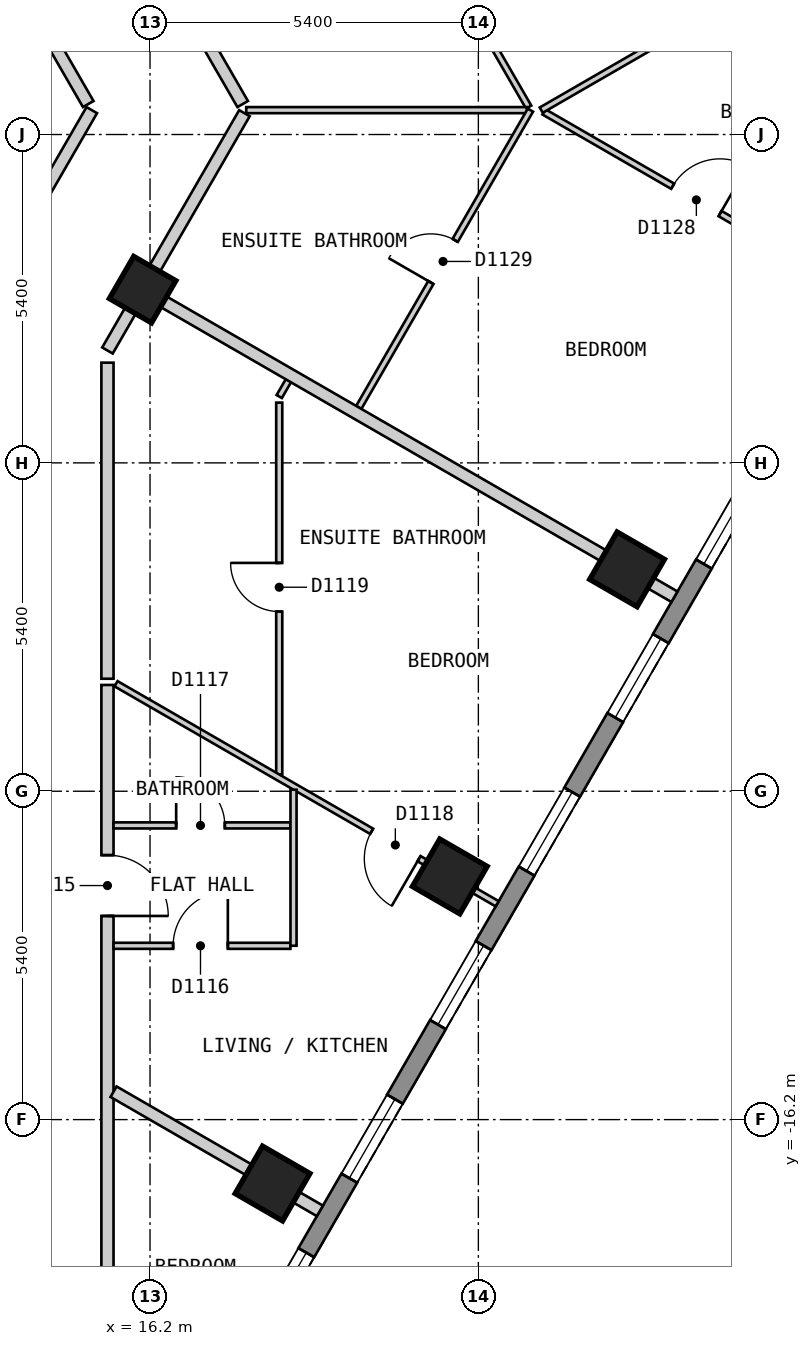
"""IFC4 building model, lengths in metres.
Left out: names, types, materials, properties, quantities, classifications, styles, units other than length and angle.
Written with IfcOpenShell. Run it as: python <this file> out.ifc"""

import sys

from ifc_helpers import new_model, si_unit, direction, frame, frame_2d, origin, origin_2d, place, context, subcontext, project, spatial, polyline, rectangle, outline, extrude, element, fill, save


model = new_model("IFC4")
c1 = context("Model", 3, precision=1e-05, world=origin(), true_north=direction((0.0, 1.0)))
c2 = subcontext(c1, "Body", "Model", "MODEL_VIEW")
j1 = project(units=[si_unit("LENGTHUNIT", "METRE"), si_unit("PLANEANGLEUNIT", "RADIAN")], contexts=[c1])
p1 = place(None, origin())
s1 = spatial("IfcSite", under=j1, at=p1, CompositionType="ELEMENT")
p2 = place(p1, origin())
s2 = spatial("IfcBuilding", under=s1, at=p2, CompositionType="ELEMENT")
p3 = place(p2, frame((0.0, 0.0, 144.6)))
s3 = spatial("IfcBuildingStorey", under=s2, at=p3, CompositionType="ELEMENT", Elevation=144.6)
for number, where, z_axis, x_axis in (
    (1, (18.215, -17.251, 0.0), (0.0, 0.0, 1.0), (0.5, 0.866, 0.0)),
    (2, (21.13, -12.201, 0.0), (0.0, 0.0, 1.0), (0.5, 0.866, 0.0)),
    (3, (24.046, -7.151, 0.0), (0.0, 0.0, 1.0), (0.5, 0.866, 0.0)),
):
    element("IfcColumn", number, at=place(p3, frame(where, z_axis=z_axis, x_axis=x_axis)), inside=s3, PredefinedType="COLUMN", context=c2, shape_type="SweptSolid", body=[
        extrude(rectangle(XDim=0.9, YDim=0.9, at=origin_2d()), origin(), (0.0, 0.0, 1.0), 3.0),
    ])
p4 = place(p3, frame((16.078, -2.551, 0.0), z_axis=(0.0, 0.0, 1.0), x_axis=(0.5, 0.866025403784, 0.0)))
e4 = element("IfcColumn", 4, at=p4, inside=s3, PredefinedType="COLUMN", context=c2, shape_type="SweptSolid", body=[
    extrude(rectangle(XDim=0.8, YDim=0.8, at=origin_2d()), origin(), (0.0, 0.0, 1.0), 3.0),
])
p5 = place(p3, frame((15.862, -23.425, 0.0), z_axis=(0.0, 0.0, 1.0), x_axis=(0.500017503135, 0.866015298109, 0.0)))
e5 = element("IfcWall", 5, at=p5, inside=s3, PredefinedType="SOLIDWALL", context=c2, shape_type="SweptSolid", body=[
    extrude(outline(polyline([(0.0, -0.15), (24.711, -0.15), (24.631, 0.15), (0.08, 0.15), (0.0, -0.15)])), origin(), (0.0, 0.0, 1.0), 2.7),
])
p6 = place(p5, frame((1.4, 0.0, 0.15)))
e6 = element("IfcOpeningElement", 6, at=p6, cuts=e5, PredefinedType="OPENING", context=c2, shape_type="SweptSolid", body=[
    extrude(rectangle(XDim=1.5, YDim=2.1, at=frame_2d((0.75, 1.05))), frame((0.0, 0.16, 0.0), z_axis=(0.0, -1.0, 0.0), x_axis=(1.0, 0.0, 0.0)), (0.0, 0.0, 1.0), 0.32),
])
p7 = place(p5, frame((4.316, 0.0, 0.15)))
e7 = element("IfcOpeningElement", 7, at=p7, cuts=e5, PredefinedType="OPENING", context=c2, shape_type="SweptSolid", body=[
    extrude(rectangle(XDim=1.5, YDim=2.1, at=frame_2d((0.75, 1.05))), frame((0.0, 0.16, 0.0), z_axis=(0.0, -1.0, 0.0), x_axis=(1.0, 0.0, 0.0)), (0.0, 0.0, 1.0), 0.32),
])
p8 = place(p5, frame((7.231, 0.0, 0.15)))
e8 = element("IfcOpeningElement", 8, at=p8, cuts=e5, PredefinedType="OPENING", context=c2, shape_type="SweptSolid", body=[
    extrude(rectangle(XDim=1.5, YDim=2.1, at=frame_2d((0.75, 1.05))), frame((0.0, 0.16, 0.0), z_axis=(0.0, -1.0, 0.0), x_axis=(1.0, 0.0, 0.0)), (0.0, 0.0, 1.0), 0.32),
])
p9 = place(p5, frame((10.147, 0.0, 0.15)))
e9 = element("IfcOpeningElement", 9, at=p9, cuts=e5, PredefinedType="OPENING", context=c2, shape_type="SweptSolid", body=[
    extrude(rectangle(XDim=1.5, YDim=2.1, at=frame_2d((0.75, 1.05))), frame((0.0, 0.16, 0.0), z_axis=(0.0, -1.0, 0.0), x_axis=(1.0, 0.0, 0.0)), (0.0, 0.0, 1.0), 0.32),
])
p10 = place(p5, frame((13.062, 0.0, 0.15)))
e10 = element("IfcOpeningElement", 10, at=p10, cuts=e5, PredefinedType="OPENING", context=c2, shape_type="SweptSolid", body=[
    extrude(rectangle(XDim=1.5, YDim=2.1, at=frame_2d((0.75, 1.05))), frame((0.0, 0.16, 0.0), z_axis=(0.0, -1.0, 0.0), x_axis=(1.0, 0.0, 0.0)), (0.0, 0.0, 1.0), 0.32),
])
p11 = place(p5, frame((15.977, 0.0, 0.15)))
e11 = element("IfcOpeningElement", 11, at=p11, cuts=e5, PredefinedType="OPENING", context=c2, shape_type="SweptSolid", body=[
    extrude(rectangle(XDim=1.5, YDim=2.1, at=frame_2d((0.75, 1.05))), frame((0.0, 0.16, 0.0), z_axis=(0.0, -1.0, 0.0), x_axis=(1.0, 0.0, 0.0)), (0.0, 0.0, 1.0), 0.32),
])
p12 = place(p5, frame((18.893, 0.0, 0.15)))
e12 = element("IfcOpeningElement", 12, at=p12, cuts=e5, PredefinedType="OPENING", context=c2, shape_type="SweptSolid", body=[
    extrude(rectangle(XDim=1.5, YDim=2.1, at=frame_2d((0.75, 1.05))), frame((0.0, 0.16, 0.0), z_axis=(0.0, -1.0, 0.0), x_axis=(1.0, 0.0, 0.0)), (0.0, 0.0, 1.0), 0.32),
])
p13 = place(p5, frame((21.809, 0.0, 0.15)))
e13 = element("IfcOpeningElement", 13, at=p13, cuts=e5, PredefinedType="OPENING", context=c2, shape_type="SweptSolid", body=[
    extrude(rectangle(XDim=1.5, YDim=2.1, at=frame_2d((0.75, 1.05))), frame((0.0, 0.16, 0.0), z_axis=(0.0, -1.0, 0.0), x_axis=(1.0, 0.0, 0.0)), (0.0, 0.0, 1.0), 0.32),
])
p14 = place(p3, frame((7.967, 13.0, 0.0), z_axis=(0.0, 0.0, 1.0), x_axis=(0.50003774998, -0.866003607726, 0.0)))
e14 = element("IfcWall", 14, at=p14, inside=s3, PredefinedType="PARTITIONING", context=c2, shape_type="SweptSolid", body=[
    extrude(rectangle(XDim=14.433, YDim=0.2, at=frame_2d((7.217, 0.0))), origin(), (0.0, 0.0, 1.0), 2.7),
])
p15 = place(p14, frame((6.824, 0.0, 0.0)))
e15 = element("IfcOpeningElement", 15, at=p15, cuts=e14, PredefinedType="OPENING", context=c2, shape_type="SweptSolid", body=[
    extrude(rectangle(XDim=0.9, YDim=2.1, at=frame_2d((0.45, 1.05))), frame((0.0, 0.11, 0.0), z_axis=(0.0, -1.0, 0.0), x_axis=(1.0, 0.0, 0.0)), (0.0, 0.0, 1.0), 0.22),
])
p16 = place(p3, frame((9.296, 15.1, 0.0), z_axis=(0.0, 0.0, 1.0), x_axis=(0.499974024244, -0.866040400375, 0.0)))
e16 = element("IfcWall", 16, at=p16, inside=s3, PredefinedType="PARTITIONING", context=c2, shape_type="SweptSolid", body=[
    extrude(rectangle(XDim=16.857, YDim=0.2, at=frame_2d((8.429, 0.0))), origin(), (0.0, 0.0, 1.0), 2.7),
])
p17 = place(p16, frame((11.522, 0.0, 0.0)))
e17 = element("IfcOpeningElement", 17, at=p17, cuts=e16, PredefinedType="OPENING", context=c2, shape_type="SweptSolid", body=[
    extrude(rectangle(XDim=1.0, YDim=2.1, at=frame_2d((0.5, 1.05))), frame((0.0, 0.11, 0.0), z_axis=(0.0, -1.0, 0.0), x_axis=(1.0, 0.0, 0.0)), (0.0, 0.0, 1.0), 0.22),
])
p18 = place(p3, frame((15.5, -3.752, 0.0), z_axis=(0.0, 0.0, 1.0), x_axis=(0.0, -1.0, 0.0)))
e18 = element("IfcWall", 18, at=p18, inside=s3, PredefinedType="PARTITIONING", context=c2, shape_type="SweptSolid", body=[
    extrude(rectangle(XDim=5.198, YDim=0.2, at=frame_2d((2.599, 0.0))), origin(), (0.0, 0.0, 1.0), 2.7),
])
p19 = place(p3, frame((13.394, -2.8, 0.0), z_axis=(0.0, 0.0, 1.0), x_axis=(0.499968324138, 0.866043691079, 0.0)))
e19 = element("IfcWall", 19, at=p19, inside=s3, PredefinedType="PARTITIONING", context=c2, shape_type="SweptSolid", body=[
    extrude(rectangle(XDim=3.696, YDim=0.2, at=frame_2d((1.848, 0.0))), origin(), (0.0, 0.0, 1.0), 2.7),
])
p20 = place(p3, frame((15.5, -3.552, 0.0), z_axis=(0.0, 0.0, 1.0), x_axis=(0.499914724673, 0.86607463192, 0.0)))
e20 = element("IfcWall", 20, at=p20, inside=s3, PredefinedType="PARTITIONING", context=c2, shape_type="SweptSolid", body=[
    extrude(rectangle(XDim=4.507, YDim=0.2, at=frame_2d((2.253, 0.0))), origin(), (0.0, 0.0, 1.0), 2.7),
])
p21 = place(p3, frame((15.5, -21.199, 0.0), z_axis=(0.0, 0.0, 1.0), x_axis=(0.0, 1.0, 0.0)))
e21 = element("IfcWall", 21, at=p21, inside=s3, PredefinedType="PARTITIONING", context=c2, shape_type="SweptSolid", body=[
    extrude(rectangle(XDim=12.147, YDim=0.2, at=frame_2d((6.073, 0.0))), origin(), (0.0, 0.0, 1.0), 2.7),
])
p22 = place(p21, frame((8.348, 0.0, 0.0)))
e22 = element("IfcOpeningElement", 22, at=p22, cuts=e21, PredefinedType="OPENING", context=c2, shape_type="SweptSolid", body=[
    extrude(rectangle(XDim=1.0, YDim=2.1, at=frame_2d((0.5, 1.05))), frame((0.0, 0.11, 0.0), z_axis=(0.0, -1.0, 0.0), x_axis=(1.0, 0.0, 0.0)), (0.0, 0.0, 1.0), 0.22),
])
p23 = place(p3, frame((14.323, 14.487, 0.0), z_axis=(0.0, 0.0, 1.0), x_axis=(0.500011052545, -0.866019022501, 0.0)))
e23 = element("IfcWall", 23, at=p23, inside=s3, PredefinedType="PARTITIONING", context=c2, shape_type="SweptSolid", body=[
    extrude(rectangle(XDim=16.208, YDim=0.1, at=frame_2d((8.104, 0.0))), origin(), (0.0, 0.0, 1.0), 2.7),
])
p24 = place(p23, frame((8.484, 0.0, 0.0)))
e24 = element("IfcOpeningElement", 24, at=p24, cuts=e23, PredefinedType="OPENING", context=c2, shape_type="SweptSolid", body=[
    extrude(rectangle(XDim=0.9, YDim=2.1, at=frame_2d((0.45, 1.05))), frame((0.0, 0.06, 0.0), z_axis=(0.0, -1.0, 0.0), x_axis=(1.0, 0.0, 0.0)), (0.0, 0.0, 1.0), 0.12),
])
p25 = place(p23, frame((2.252, 0.0, 0.0)))
e25 = element("IfcOpeningElement", 25, at=p25, cuts=e23, PredefinedType="OPENING", context=c2, shape_type="SweptSolid", body=[
    extrude(rectangle(XDim=0.8, YDim=2.1, at=frame_2d((0.4, 1.05))), frame((0.0, 0.06, 0.0), z_axis=(0.0, -1.0, 0.0), x_axis=(1.0, 0.0, 0.0)), (0.0, 0.0, 1.0), 0.12),
])
p26 = place(p23, frame((13.167, 0.0, 0.0)))
e26 = element("IfcOpeningElement", 26, at=p26, cuts=e23, PredefinedType="OPENING", context=c2, shape_type="SweptSolid", body=[
    extrude(rectangle(XDim=0.8, YDim=2.1, at=frame_2d((0.4, 1.05))), frame((0.0, 0.06, 0.0), z_axis=(0.0, -1.0, 0.0), x_axis=(1.0, 0.0, 0.0)), (0.0, 0.0, 1.0), 0.12),
])
p27 = place(p3, frame((18.325, -4.409, 0.0), z_axis=(0.0, 0.0, 1.0), x_axis=(0.0, -1.0, 0.0)))
e27 = element("IfcWall", 27, at=p27, inside=s3, PredefinedType="PARTITIONING", context=c2, shape_type="SweptSolid", body=[
    extrude(rectangle(XDim=6.115, YDim=0.1, at=frame_2d((3.058, 0.0))), origin(), (0.0, 0.0, 1.0), 2.7),
])
p28 = place(p27, frame((2.636, 0.0, 0.0)))
e28 = element("IfcOpeningElement", 28, at=p28, cuts=e27, PredefinedType="OPENING", context=c2, shape_type="SweptSolid", body=[
    extrude(rectangle(XDim=0.8, YDim=2.1, at=frame_2d((0.4, 1.05))), frame((0.0, 0.06, 0.0), z_axis=(0.0, -1.0, 0.0), x_axis=(1.0, 0.0, 0.0)), (0.0, 0.0, 1.0), 0.12),
])
p29 = place(p3, frame((15.641, -9.032, 0.0), z_axis=(0.0, 0.0, 1.0), x_axis=(0.866049104564, -0.499958946799, 0.0)))
e29 = element("IfcWall", 29, at=p29, inside=s3, PredefinedType="PARTITIONING", context=c2, shape_type="SweptSolid", body=[
    extrude(rectangle(XDim=7.238, YDim=0.1, at=frame_2d((3.619, 0.0))), origin(), (0.0, 0.0, 1.0), 2.7),
])
p30 = place(p29, frame((4.854, 0.0, 0.0)))
e30 = element("IfcOpeningElement", 30, at=p30, cuts=e29, PredefinedType="OPENING", context=c2, shape_type="SweptSolid", body=[
    extrude(rectangle(XDim=0.9, YDim=2.1, at=frame_2d((0.45, 1.05))), frame((0.0, 0.06, 0.0), z_axis=(0.0, -1.0, 0.0), x_axis=(1.0, 0.0, 0.0)), (0.0, 0.0, 1.0), 0.12),
])
p31 = place(p3, frame((22.679, 0.372, 0.0), z_axis=(0.0, 0.0, 1.0), x_axis=(0.865985260119, -0.500069524424, 0.0)))
e31 = element("IfcWall", 31, at=p31, inside=s3, PredefinedType="PARTITIONING", context=c2, shape_type="SweptSolid", body=[
    extrude(rectangle(XDim=5.845, YDim=0.1, at=frame_2d((2.923, 0.0))), origin(), (0.0, 0.0, 1.0), 2.7),
])
p32 = place(p31, frame((2.444, 0.0, 0.0)))
e32 = element("IfcOpeningElement", 32, at=p32, cuts=e31, PredefinedType="OPENING", context=c2, shape_type="SweptSolid", body=[
    extrude(rectangle(XDim=0.9, YDim=2.1, at=frame_2d((0.45, 1.05))), frame((0.0, 0.06, 0.0), z_axis=(0.0, -1.0, 0.0), x_axis=(1.0, 0.0, 0.0)), (0.0, 0.0, 1.0), 0.12),
])
p33 = place(p3, frame((15.6, -11.362, 0.0), z_axis=(0.0, 0.0, 1.0), x_axis=(1.0, 0.0, 0.0)))
e33 = element("IfcWall", 33, at=p33, inside=s3, PredefinedType="PARTITIONING", context=c2, shape_type="SweptSolid", body=[
    extrude(rectangle(XDim=2.91, YDim=0.1, at=frame_2d((1.455, 0.0))), origin(), (0.0, 0.0, 1.0), 2.7),
])
p34 = place(p33, frame((1.03, 0.0, 0.0)))
e34 = element("IfcOpeningElement", 34, at=p34, cuts=e33, PredefinedType="OPENING", context=c2, shape_type="SweptSolid", body=[
    extrude(rectangle(XDim=0.8, YDim=2.1, at=frame_2d((0.4, 1.05))), frame((0.0, 0.06, 0.0), z_axis=(0.0, -1.0, 0.0), x_axis=(1.0, 0.0, 0.0)), (0.0, 0.0, 1.0), 0.12),
])
p35 = place(p3, frame((15.6, -13.342, 0.0), z_axis=(0.0, 0.0, 1.0), x_axis=(1.0, 0.0, 0.0)))
e35 = element("IfcWall", 35, at=p35, inside=s3, PredefinedType="PARTITIONING", context=c2, shape_type="SweptSolid", body=[
    extrude(rectangle(XDim=2.909, YDim=0.1, at=frame_2d((1.455, 0.0))), origin(), (0.0, 0.0, 1.0), 2.7),
])
p36 = place(p35, frame((0.98, 0.0, 0.0)))
e36 = element("IfcOpeningElement", 36, at=p36, cuts=e35, PredefinedType="OPENING", context=c2, shape_type="SweptSolid", body=[
    extrude(rectangle(XDim=0.9, YDim=2.1, at=frame_2d((0.45, 1.05))), frame((0.0, 0.06, 0.0), z_axis=(0.0, -1.0, 0.0), x_axis=(1.0, 0.0, 0.0)), (0.0, 0.0, 1.0), 0.12),
])
p37 = place(p3, frame((17.782, 0.401, 0.0), z_axis=(0.0, 0.0, 1.0), x_axis=(1.0, 0.0, 0.0)))
e37 = element("IfcWall", 37, at=p37, inside=s3, PredefinedType="PARTITIONING", context=c2, shape_type="SweptSolid", body=[
    extrude(rectangle(XDim=4.616, YDim=0.1, at=frame_2d((2.308, 0.0))), origin(), (0.0, 0.0, 1.0), 2.7),
])
p38 = place(p3, frame((18.325, -4.309, 0.0), z_axis=(0.0, 0.0, 1.0), x_axis=(0.5014706583, 0.865174652232, 0.0)))
e38 = element("IfcWall", 38, at=p38, inside=s3, PredefinedType="PARTITIONING", context=c2, shape_type="SweptSolid", body=[
    extrude(rectangle(XDim=0.399, YDim=0.1, at=frame_2d((0.199, 0.0))), origin(), (0.0, 0.0, 1.0), 2.7),
])
p39 = place(p3, frame((19.633, -4.488, 0.0), z_axis=(0.0, 0.0, 1.0), x_axis=(0.500050624552, 0.865996173713, 0.0)))
e39 = element("IfcWall", 39, at=p39, inside=s3, PredefinedType="PARTITIONING", context=c2, shape_type="SweptSolid", body=[
    extrude(rectangle(XDim=5.646, YDim=0.1, at=frame_2d((2.823, 0.0))), origin(), (0.0, 0.0, 1.0), 2.7),
])
p40 = place(p39, frame((2.372, 0.0, 0.0)))
e40 = element("IfcOpeningElement", 40, at=p40, cuts=e39, PredefinedType="OPENING", context=c2, shape_type="SweptSolid", body=[
    extrude(rectangle(XDim=0.8, YDim=2.1, at=frame_2d((0.4, 1.05))), frame((0.0, 0.06, 0.0), z_axis=(0.0, -1.0, 0.0), x_axis=(1.0, 0.0, 0.0)), (0.0, 0.0, 1.0), 0.12),
])
p41 = place(p3, frame((18.56, -13.341, 0.0), z_axis=(0.0, 0.0, 1.0), x_axis=(0.0, 1.0, 0.0)))
e41 = element("IfcWall", 41, at=p41, inside=s3, PredefinedType="PARTITIONING", context=c2, shape_type="SweptSolid", body=[
    extrude(rectangle(XDim=2.566, YDim=0.1, at=frame_2d((1.283, 0.0))), origin(), (0.0, 0.0, 1.0), 2.7),
])
p42 = place(p3, frame((22.634, 0.401, 0.0), z_axis=(0.0, 0.0, 1.0), x_axis=(0.86601325737, 0.500021037617, 0.0)))
e42 = element("IfcWall", 42, at=p42, inside=s3, PredefinedType="PARTITIONING", context=c2, shape_type="SweptSolid", body=[
    extrude(rectangle(XDim=5.898, YDim=0.1, at=frame_2d((2.949, 0.0))), origin(), (0.0, 0.0, 1.0), 2.7),
])
p43 = place(p42, frame((2.499, 0.0, 0.0)))
e43 = element("IfcOpeningElement", 43, at=p43, cuts=e42, PredefinedType="OPENING", context=c2, shape_type="SweptSolid", body=[
    extrude(rectangle(XDim=0.9, YDim=2.1, at=frame_2d((0.45, 1.05))), frame((0.0, 0.06, 0.0), z_axis=(0.0, -1.0, 0.0), x_axis=(1.0, 0.0, 0.0)), (0.0, 0.0, 1.0), 0.12),
])
p44 = place(p3, frame((15.6, -15.741, 0.0), z_axis=(0.0, 0.0, 1.0), x_axis=(0.865964599155, -0.500105301922, 0.0)))
e44 = element("IfcWall", 44, at=p44, inside=s3, PredefinedType="PARTITIONING", context=c2, shape_type="SweptSolid", body=[
    extrude(rectangle(XDim=3.919, YDim=0.2, at=frame_2d((1.959, 0.0))), origin(), (0.0, 0.0, 1.0), 2.7),
])
p45 = place(p3, frame((16.165, -2.601, 0.0), z_axis=(0.0, 0.0, 1.0), x_axis=(0.866016855193, -0.500014806302, 0.0)))
e45 = element("IfcWall", 45, at=p45, inside=s3, PredefinedType="PARTITIONING", context=c2, shape_type="SweptSolid", body=[
    extrude(rectangle(XDim=10.0, YDim=0.2, at=frame_2d((5.0, 0.0))), origin(), (0.0, 0.0, 1.0), 2.7),
])
p46 = place(p7, origin())
e46 = element("IfcWindow", 46, at=p46, inside=s3, PartitioningType="SINGLE_PANEL", PredefinedType="WINDOW", context=c2, shape_type="SweptSolid", body=[
    extrude(rectangle(XDim=1.5, YDim=2.1, at=frame_2d((0.75, 1.05))), frame((0.0, 0.03, 0.0), z_axis=(0.0, -1.0, 0.0), x_axis=(1.0, 0.0, 0.0)), (0.0, 0.0, 1.0), 0.06),
])
fill(e7, e46)
p47 = place(p8, origin())
e47 = element("IfcWindow", 47, at=p47, inside=s3, PartitioningType="SINGLE_PANEL", PredefinedType="WINDOW", context=c2, shape_type="SweptSolid", body=[
    extrude(rectangle(XDim=1.5, YDim=2.1, at=frame_2d((0.75, 1.05))), frame((0.0, 0.03, 0.0), z_axis=(0.0, -1.0, 0.0), x_axis=(1.0, 0.0, 0.0)), (0.0, 0.0, 1.0), 0.06),
])
fill(e8, e47)
p48 = place(p9, origin())
e48 = element("IfcWindow", 48, at=p48, inside=s3, PartitioningType="SINGLE_PANEL", PredefinedType="WINDOW", context=c2, shape_type="SweptSolid", body=[
    extrude(rectangle(XDim=1.5, YDim=2.1, at=frame_2d((0.75, 1.05))), frame((0.0, 0.03, 0.0), z_axis=(0.0, -1.0, 0.0), x_axis=(1.0, 0.0, 0.0)), (0.0, 0.0, 1.0), 0.06),
])
fill(e9, e48)
p49 = place(p10, origin())
e49 = element("IfcWindow", 49, at=p49, inside=s3, PartitioningType="SINGLE_PANEL", PredefinedType="WINDOW", context=c2, shape_type="SweptSolid", body=[
    extrude(rectangle(XDim=1.5, YDim=2.1, at=frame_2d((0.75, 1.05))), frame((0.0, 0.03, 0.0), z_axis=(0.0, -1.0, 0.0), x_axis=(1.0, 0.0, 0.0)), (0.0, 0.0, 1.0), 0.06),
])
fill(e10, e49)
p50 = place(p11, origin())
e50 = element("IfcWindow", 50, at=p50, inside=s3, PartitioningType="SINGLE_PANEL", PredefinedType="WINDOW", context=c2, shape_type="SweptSolid", body=[
    extrude(rectangle(XDim=1.5, YDim=2.1, at=frame_2d((0.75, 1.05))), frame((0.0, 0.03, 0.0), z_axis=(0.0, -1.0, 0.0), x_axis=(1.0, 0.0, 0.0)), (0.0, 0.0, 1.0), 0.06),
])
fill(e11, e50)
p51 = place(p12, origin())
e51 = element("IfcWindow", 51, at=p51, inside=s3, PartitioningType="SINGLE_PANEL", PredefinedType="WINDOW", context=c2, shape_type="SweptSolid", body=[
    extrude(rectangle(XDim=1.5, YDim=2.1, at=frame_2d((0.75, 1.05))), frame((0.0, 0.03, 0.0), z_axis=(0.0, -1.0, 0.0), x_axis=(1.0, 0.0, 0.0)), (0.0, 0.0, 1.0), 0.06),
])
fill(e12, e51)
p52 = place(p22, origin())
e52 = element("IfcDoor", 52, at=p52, inside=s3, OperationType="SINGLE_SWING_LEFT", PredefinedType="DOOR", context=c2, shape_type="SweptSolid", body=[
    extrude(rectangle(XDim=1.0, YDim=2.1, at=frame_2d((0.5, 1.05))), frame((0.0, 0.025, 0.0), z_axis=(0.0, -1.0, 0.0), x_axis=(1.0, 0.0, 0.0)), (0.0, 0.0, 1.0), 0.05),
])
fill(e22, e52)
p53 = place(p36, origin())
e53 = element("IfcDoor", 53, at=p53, inside=s3, OperationType="SINGLE_SWING_RIGHT", PredefinedType="DOOR", context=c2, shape_type="SweptSolid", body=[
    extrude(rectangle(XDim=0.9, YDim=2.1, at=frame_2d((0.45, 1.05))), frame((0.0, 0.025, 0.0), z_axis=(0.0, -1.0, 0.0), x_axis=(1.0, 0.0, 0.0)), (0.0, 0.0, 1.0), 0.05),
])
fill(e36, e53)
p54 = place(p34, origin())
e54 = element("IfcDoor", 54, at=p54, inside=s3, OperationType="SINGLE_SWING_LEFT", PredefinedType="DOOR", context=c2, shape_type="SweptSolid", body=[
    extrude(rectangle(XDim=0.8, YDim=2.1, at=frame_2d((0.4, 1.05))), frame((0.0, 0.025, 0.0), z_axis=(0.0, -1.0, 0.0), x_axis=(1.0, 0.0, 0.0)), (0.0, 0.0, 1.0), 0.05),
])
fill(e34, e54)
p55 = place(p30, origin())
e55 = element("IfcDoor", 55, at=p55, inside=s3, OperationType="SINGLE_SWING_RIGHT", PredefinedType="DOOR", context=c2, shape_type="SweptSolid", body=[
    extrude(rectangle(XDim=0.9, YDim=2.1, at=frame_2d((0.45, 1.05))), frame((0.0, 0.025, 0.0), z_axis=(0.0, -1.0, 0.0), x_axis=(1.0, 0.0, 0.0)), (0.0, 0.0, 1.0), 0.05),
])
fill(e30, e55)
p56 = place(p28, origin())
e56 = element("IfcDoor", 56, at=p56, inside=s3, OperationType="SINGLE_SWING_LEFT", PredefinedType="DOOR", context=c2, shape_type="SweptSolid", body=[
    extrude(rectangle(XDim=0.8, YDim=2.1, at=frame_2d((0.4, 1.05))), frame((0.0, 0.025, 0.0), z_axis=(0.0, -1.0, 0.0), x_axis=(1.0, 0.0, 0.0)), (0.0, 0.0, 1.0), 0.05),
])
fill(e28, e56)
p57 = place(p32, origin())
e57 = element("IfcDoor", 57, at=p57, inside=s3, OperationType="SINGLE_SWING_RIGHT", PredefinedType="DOOR", context=c2, shape_type="SweptSolid", body=[
    extrude(rectangle(XDim=0.9, YDim=2.1, at=frame_2d((0.45, 1.05))), frame((0.0, 0.025, 0.0), z_axis=(0.0, -1.0, 0.0), x_axis=(1.0, 0.0, 0.0)), (0.0, 0.0, 1.0), 0.05),
])
fill(e32, e57)
p58 = place(p40, origin())
e58 = element("IfcDoor", 58, at=p58, inside=s3, OperationType="SINGLE_SWING_LEFT", PredefinedType="DOOR", context=c2, shape_type="SweptSolid", body=[
    extrude(rectangle(XDim=0.8, YDim=2.1, at=frame_2d((0.4, 1.05))), frame((0.0, 0.025, 0.0), z_axis=(0.0, -1.0, 0.0), x_axis=(1.0, 0.0, 0.0)), (0.0, 0.0, 1.0), 0.05),
])
fill(e40, e58)
save(model, sys.argv[1])
